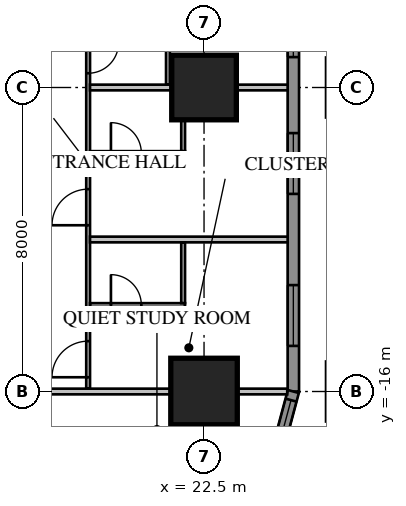
"""IFC4 building model, lengths in metres.
Left out: names, types, materials, properties, quantities, classifications, styles, units other than length and angle.
Written with IfcOpenShell. Run it as: python <this file> out.ifc"""

import sys

from ifc_helpers import new_model, si_unit, direction, frame, frame_2d, origin, origin_2d, place, context, subcontext, project, spatial, rectangle, extrude, element, fill, save


model = new_model("IFC4")
c1 = context("Model", 3, precision=1e-05, world=origin(), true_north=direction((0.0, 1.0)))
c2 = subcontext(c1, "Body", "Model", "MODEL_VIEW")
j1 = project(units=[si_unit("LENGTHUNIT", "METRE"), si_unit("PLANEANGLEUNIT", "RADIAN")], contexts=[c1])
p1 = place(None, origin())
s1 = spatial("IfcSite", under=j1, at=p1, CompositionType="ELEMENT")
p2 = place(p1, origin())
s2 = spatial("IfcBuilding", under=s1, at=p2, CompositionType="ELEMENT")
p3 = place(p2, frame((0.0, 0.0, 42.95)))
s3 = spatial("IfcBuildingStorey", under=s2, at=p3, CompositionType="ELEMENT", Elevation=42.95)
p4 = place(p3, frame((22.5, -16.0, 0.0), z_axis=(0.0, 0.0, 1.0), x_axis=(1.0, 0.0, 0.0)))
e1 = element("IfcColumn", 1, at=p4, inside=s3, PredefinedType="COLUMN", context=c2, shape_type="SweptSolid", body=[
    extrude(rectangle(XDim=1.75, YDim=1.75, at=origin_2d()), origin(), (0.0, 0.0, 1.0), 3.85),
])
p5 = place(p3, frame((22.5, -8.0, 0.0), z_axis=(0.0, 0.0, 1.0), x_axis=(1.0, 0.0, 0.0)))
e2 = element("IfcColumn", 2, at=p5, inside=s3, PredefinedType="COLUMN", context=c2, shape_type="SweptSolid", body=[
    extrude(rectangle(XDim=1.7, YDim=1.7, at=origin_2d()), origin(), (0.0, 0.0, 1.0), 3.85),
])
p6 = place(p3, frame((24.85, -16.0, 0.0), z_axis=(0.0, 0.0, 1.0), x_axis=(0.0, 1.0, 0.0)))
e3 = element("IfcWall", 3, at=p6, inside=s3, PredefinedType="SOLIDWALL", context=c2, shape_type="SweptSolid", body=[
    extrude(rectangle(XDim=32.0, YDim=0.3, at=frame_2d((16.0, 0.0))), origin(), (0.0, 0.0, 1.0), 3.65),
])
p7 = place(p6, frame((1.2, 0.0, 0.75)))
e4 = element("IfcOpeningElement", 4, at=p7, cuts=e3, PredefinedType="OPENING", context=c2, shape_type="SweptSolid", body=[
    extrude(rectangle(XDim=1.6, YDim=1.8, at=frame_2d((0.8, 0.9))), frame((0.0, 0.17, 0.0), z_axis=(0.0, -1.0, 0.0), x_axis=(1.0, 0.0, 0.0)), (0.0, 0.0, 1.0), 0.34),
])
p8 = place(p6, frame((5.2, 0.0, 0.75)))
e5 = element("IfcOpeningElement", 5, at=p8, cuts=e3, PredefinedType="OPENING", context=c2, shape_type="SweptSolid", body=[
    extrude(rectangle(XDim=1.6, YDim=1.8, at=frame_2d((0.8, 0.9))), frame((0.0, 0.17, 0.0), z_axis=(0.0, -1.0, 0.0), x_axis=(1.0, 0.0, 0.0)), (0.0, 0.0, 1.0), 0.34),
])
p9 = place(p6, frame((17.2, 0.0, 0.75)))
e6 = element("IfcOpeningElement", 6, at=p9, cuts=e3, PredefinedType="OPENING", context=c2, shape_type="SweptSolid", body=[
    extrude(rectangle(XDim=1.6, YDim=1.8, at=frame_2d((0.8, 0.9))), frame((0.0, 0.17, 0.0), z_axis=(0.0, -1.0, 0.0), x_axis=(1.0, 0.0, 0.0)), (0.0, 0.0, 1.0), 0.34),
])
p10 = place(p6, frame((21.2, 0.0, 0.75)))
e7 = element("IfcOpeningElement", 7, at=p10, cuts=e3, PredefinedType="OPENING", context=c2, shape_type="SweptSolid", body=[
    extrude(rectangle(XDim=1.6, YDim=1.8, at=frame_2d((0.8, 0.9))), frame((0.0, 0.17, 0.0), z_axis=(0.0, -1.0, 0.0), x_axis=(1.0, 0.0, 0.0)), (0.0, 0.0, 1.0), 0.34),
])
p11 = place(p6, frame((25.2, 0.0, 0.75)))
e8 = element("IfcOpeningElement", 8, at=p11, cuts=e3, PredefinedType="OPENING", context=c2, shape_type="SweptSolid", body=[
    extrude(rectangle(XDim=1.6, YDim=1.8, at=frame_2d((0.8, 0.9))), frame((0.0, 0.17, 0.0), z_axis=(0.0, -1.0, 0.0), x_axis=(1.0, 0.0, 0.0)), (0.0, 0.0, 1.0), 0.34),
])
p12 = place(p6, frame((29.2, 0.0, 0.75)))
e9 = element("IfcOpeningElement", 9, at=p12, cuts=e3, PredefinedType="OPENING", context=c2, shape_type="SweptSolid", body=[
    extrude(rectangle(XDim=1.6, YDim=1.8, at=frame_2d((0.8, 0.9))), frame((0.0, 0.17, 0.0), z_axis=(0.0, -1.0, 0.0), x_axis=(1.0, 0.0, 0.0)), (0.0, 0.0, 1.0), 0.34),
])
p13 = place(p6, frame((8.8, 0.0, 0.75)))
e10 = element("IfcOpeningElement", 10, at=p13, cuts=e3, PredefinedType="OPENING", context=c2, shape_type="SweptSolid", body=[
    extrude(rectangle(XDim=2.4, YDim=1.8, at=frame_2d((1.2, 0.9))), frame((0.0, 0.17, 0.0), z_axis=(0.0, -1.0, 0.0), x_axis=(1.0, 0.0, 0.0)), (0.0, 0.0, 1.0), 0.34),
])
p14 = place(p6, frame((13.812, 0.0, 0.0)))
e11 = element("IfcOpeningElement", 11, at=p14, cuts=e3, PredefinedType="OPENING", context=c2, shape_type="SweptSolid", body=[
    extrude(rectangle(XDim=1.0, YDim=2.4, at=frame_2d((0.5, 1.2))), frame((0.0, 0.17, 0.0), z_axis=(0.0, -1.0, 0.0), x_axis=(1.0, 0.0, 0.0)), (0.0, 0.0, 1.0), 0.34),
])
p15 = place(p3, frame((23.664, -20.425, 0.0), z_axis=(0.0, 0.0, 1.0), x_axis=(0.258839972501, 0.965920218567, 0.0)))
e12 = element("IfcWall", 12, at=p15, inside=s3, PredefinedType="SOLIDWALL", context=c2, shape_type="SweptSolid", body=[
    extrude(rectangle(XDim=4.581, YDim=0.3, at=frame_2d((2.291, 0.0))), origin(), (0.0, 0.0, 1.0), 3.65),
])
p16 = place(p15, frame((2.746, 0.0, 0.75)))
e13 = element("IfcOpeningElement", 13, at=p16, cuts=e12, PredefinedType="OPENING", context=c2, shape_type="SweptSolid", body=[
    extrude(rectangle(XDim=1.6, YDim=1.8, at=frame_2d((0.8, 0.9))), frame((0.0, 0.17, 0.0), z_axis=(0.0, -1.0, 0.0), x_axis=(1.0, 0.0, 0.0)), (0.0, 0.0, 1.0), 0.34),
])
p17 = place(p3, frame((19.45, -15.925, 0.0), z_axis=(0.0, 0.0, 1.0), x_axis=(0.0, 1.0, 0.0)))
e14 = element("IfcWall", 14, at=p17, inside=s3, PredefinedType="PARTITIONING", context=c2, shape_type="SweptSolid", body=[
    extrude(rectangle(XDim=11.85, YDim=0.1, at=frame_2d((5.925, 0.0))), origin(), (0.0, 0.0, 1.0), 3.65),
])
p18 = place(p17, frame((10.125, 0.0, 0.0)))
e15 = element("IfcOpeningElement", 15, at=p18, cuts=e14, PredefinedType="OPENING", context=c2, shape_type="SweptSolid", body=[
    extrude(rectangle(XDim=1.0, YDim=2.1, at=frame_2d((0.5, 1.05))), frame((0.0, 0.07, 0.0), z_axis=(0.0, -1.0, 0.0), x_axis=(1.0, 0.0, 0.0)), (0.0, 0.0, 1.0), 0.14),
])
p19 = place(p17, frame((8.3, 0.0, 0.0)))
e16 = element("IfcOpeningElement", 16, at=p19, cuts=e14, PredefinedType="OPENING", context=c2, shape_type="SweptSolid", body=[
    extrude(rectangle(XDim=0.8, YDim=2.1, at=frame_2d((0.4, 1.05))), frame((0.0, 0.07, 0.0), z_axis=(0.0, -1.0, 0.0), x_axis=(1.0, 0.0, 0.0)), (0.0, 0.0, 1.0), 0.14),
])
p20 = place(p17, frame((0.3, 0.0, 0.0)))
e17 = element("IfcOpeningElement", 17, at=p20, cuts=e14, PredefinedType="OPENING", context=c2, shape_type="SweptSolid", body=[
    extrude(rectangle(XDim=0.95, YDim=2.1, at=frame_2d((0.475, 1.05))), frame((0.0, 0.07, 0.0), z_axis=(0.0, -1.0, 0.0), x_axis=(1.0, 0.0, 0.0)), (0.0, 0.0, 1.0), 0.14),
])
p21 = place(p17, frame((4.3, 0.0, 0.0)))
e18 = element("IfcOpeningElement", 18, at=p21, cuts=e14, PredefinedType="OPENING", context=c2, shape_type="SweptSolid", body=[
    extrude(rectangle(XDim=0.95, YDim=2.1, at=frame_2d((0.475, 1.05))), frame((0.0, 0.07, 0.0), z_axis=(0.0, -1.0, 0.0), x_axis=(1.0, 0.0, 0.0)), (0.0, 0.0, 1.0), 0.14),
])
p22 = place(p3, frame((21.55, -7.925, 0.0), z_axis=(0.0, 0.0, 1.0), x_axis=(0.0, 1.0, 0.0)))
e19 = element("IfcWall", 19, at=p22, inside=s3, PredefinedType="PARTITIONING", context=c2, shape_type="SweptSolid", body=[
    extrude(rectangle(XDim=1.7, YDim=0.1, at=frame_2d((0.85, 0.0))), origin(), (0.0, 0.0, 1.0), 3.65),
])
p23 = place(p3, frame((18.1, -16.0, 0.0), z_axis=(0.0, 0.0, 1.0), x_axis=(1.0, 0.0, 0.0)))
e20 = element("IfcWall", 20, at=p23, inside=s3, PredefinedType="PARTITIONING", context=c2, shape_type="SweptSolid", body=[
    extrude(rectangle(XDim=6.589, YDim=0.15, at=frame_2d((3.295, 0.0))), origin(), (0.0, 0.0, 1.0), 3.65),
])
for number, where, z_axis, x_axis in (
    (21, (19.5, -12.0, 0.0), (0.0, 0.0, 1.0), (1.0, 0.0, 0.0)),
    (22, (19.5, -8.0, 0.0), (0.0, 0.0, 1.0), (1.0, 0.0, 0.0)),
):
    element("IfcWall", number, at=place(p3, frame(where, z_axis=z_axis, x_axis=x_axis)), inside=s3, PredefinedType="PARTITIONING", context=c2, shape_type="SweptSolid", body=[
        extrude(rectangle(XDim=5.2, YDim=0.15, at=frame_2d((2.6, 0.0))), origin(), (0.0, 0.0, 1.0), 3.65),
    ])
p24 = place(p3, frame((19.5, -13.725, 0.0), z_axis=(0.0, 0.0, 1.0), x_axis=(1.0, 0.0, 0.0)))
e23 = element("IfcWall", 23, at=p24, inside=s3, PredefinedType="PARTITIONING", context=c2, shape_type="SweptSolid", body=[
    extrude(rectangle(XDim=2.5, YDim=0.1, at=frame_2d((1.25, 0.0))), origin(), (0.0, 0.0, 1.0), 3.65),
])
p25 = place(p24, frame((0.55, 0.0, 0.0)))
e24 = element("IfcOpeningElement", 24, at=p25, cuts=e23, PredefinedType="OPENING", context=c2, shape_type="SweptSolid", body=[
    extrude(rectangle(XDim=0.8, YDim=2.1, at=frame_2d((0.4, 1.05))), frame((0.0, 0.07, 0.0), z_axis=(0.0, -1.0, 0.0), x_axis=(1.0, 0.0, 0.0)), (0.0, 0.0, 1.0), 0.14),
])
p26 = place(p3, frame((21.95, -13.675, 0.0), z_axis=(0.0, 0.0, 1.0), x_axis=(0.0, 1.0, 0.0)))
e25 = element("IfcWall", 25, at=p26, inside=s3, PredefinedType="PARTITIONING", context=c2, shape_type="SweptSolid", body=[
    extrude(rectangle(XDim=1.6, YDim=0.1, at=frame_2d((0.8, 0.0))), origin(), (0.0, 0.0, 1.0), 3.65),
])
p27 = place(p3, frame((19.5, -9.725, 0.0), z_axis=(0.0, 0.0, 1.0), x_axis=(1.0, 0.0, 0.0)))
e26 = element("IfcWall", 26, at=p27, inside=s3, PredefinedType="PARTITIONING", context=c2, shape_type="SweptSolid", body=[
    extrude(rectangle(XDim=2.5, YDim=0.1, at=frame_2d((1.25, 0.0))), origin(), (0.0, 0.0, 1.0), 3.65),
])
p28 = place(p27, frame((0.55, 0.0, 0.0)))
e27 = element("IfcOpeningElement", 27, at=p28, cuts=e26, PredefinedType="OPENING", context=c2, shape_type="SweptSolid", body=[
    extrude(rectangle(XDim=0.8, YDim=2.1, at=frame_2d((0.4, 1.05))), frame((0.0, 0.07, 0.0), z_axis=(0.0, -1.0, 0.0), x_axis=(1.0, 0.0, 0.0)), (0.0, 0.0, 1.0), 0.14),
])
p29 = place(p3, frame((21.95, -9.675, 0.0), z_axis=(0.0, 0.0, 1.0), x_axis=(0.0, 1.0, 0.0)))
e28 = element("IfcWall", 28, at=p29, inside=s3, PredefinedType="PARTITIONING", context=c2, shape_type="SweptSolid", body=[
    extrude(rectangle(XDim=1.6, YDim=0.1, at=frame_2d((0.8, 0.0))), origin(), (0.0, 0.0, 1.0), 3.65),
])
p30 = place(p16, origin())
e29 = element("IfcWindow", 29, at=p30, inside=s3, PartitioningType="SINGLE_PANEL", PredefinedType="WINDOW", context=c2, shape_type="SweptSolid", body=[
    extrude(rectangle(XDim=1.6, YDim=1.8, at=frame_2d((0.8, 0.9))), frame((0.0, 0.03, 0.0), z_axis=(0.0, -1.0, 0.0), x_axis=(1.0, 0.0, 0.0)), (0.0, 0.0, 1.0), 0.06),
])
fill(e13, e29)
p31 = place(p7, origin())
e30 = element("IfcWindow", 30, at=p31, inside=s3, PartitioningType="SINGLE_PANEL", PredefinedType="WINDOW", context=c2, shape_type="SweptSolid", body=[
    extrude(rectangle(XDim=1.6, YDim=1.8, at=frame_2d((0.8, 0.9))), frame((0.0, 0.03, 0.0), z_axis=(0.0, -1.0, 0.0), x_axis=(1.0, 0.0, 0.0)), (0.0, 0.0, 1.0), 0.06),
])
fill(e4, e30)
p32 = place(p8, origin())
e31 = element("IfcWindow", 31, at=p32, inside=s3, PartitioningType="SINGLE_PANEL", PredefinedType="WINDOW", context=c2, shape_type="SweptSolid", body=[
    extrude(rectangle(XDim=1.6, YDim=1.8, at=frame_2d((0.8, 0.9))), frame((0.0, 0.03, 0.0), z_axis=(0.0, -1.0, 0.0), x_axis=(1.0, 0.0, 0.0)), (0.0, 0.0, 1.0), 0.06),
])
fill(e5, e31)
p33 = place(p13, origin())
e32 = element("IfcWindow", 32, at=p33, inside=s3, PartitioningType="SINGLE_PANEL", PredefinedType="WINDOW", context=c2, shape_type="SweptSolid", body=[
    extrude(rectangle(XDim=2.4, YDim=1.8, at=frame_2d((1.2, 0.9))), frame((0.0, 0.03, 0.0), z_axis=(0.0, -1.0, 0.0), x_axis=(1.0, 0.0, 0.0)), (0.0, 0.0, 1.0), 0.06),
])
fill(e10, e32)
p34 = place(p19, origin())
e33 = element("IfcDoor", 33, at=p34, inside=s3, OperationType="SINGLE_SWING_RIGHT", PredefinedType="DOOR", context=c2, shape_type="SweptSolid", body=[
    extrude(rectangle(XDim=0.8, YDim=2.1, at=frame_2d((0.4, 1.05))), frame((0.0, 0.025, 0.0), z_axis=(0.0, -1.0, 0.0), x_axis=(1.0, 0.0, 0.0)), (0.0, 0.0, 1.0), 0.05),
])
fill(e16, e33)
p35 = place(p20, origin())
e34 = element("IfcDoor", 34, at=p35, inside=s3, OperationType="SINGLE_SWING_LEFT", PredefinedType="DOOR", context=c2, shape_type="SweptSolid", body=[
    extrude(rectangle(XDim=0.95, YDim=2.1, at=frame_2d((0.475, 1.05))), frame((0.0, 0.025, 0.0), z_axis=(0.0, -1.0, 0.0), x_axis=(1.0, 0.0, 0.0)), (0.0, 0.0, 1.0), 0.05),
])
fill(e17, e34)
p36 = place(p25, origin())
e35 = element("IfcDoor", 35, at=p36, inside=s3, OperationType="SINGLE_SWING_LEFT", PredefinedType="DOOR", context=c2, shape_type="SweptSolid", body=[
    extrude(rectangle(XDim=0.8, YDim=2.1, at=frame_2d((0.4, 1.05))), frame((0.0, 0.025, 0.0), z_axis=(0.0, -1.0, 0.0), x_axis=(1.0, 0.0, 0.0)), (0.0, 0.0, 1.0), 0.05),
])
fill(e24, e35)
p37 = place(p21, origin())
e36 = element("IfcDoor", 36, at=p37, inside=s3, OperationType="SINGLE_SWING_LEFT", PredefinedType="DOOR", context=c2, shape_type="SweptSolid", body=[
    extrude(rectangle(XDim=0.95, YDim=2.1, at=frame_2d((0.475, 1.05))), frame((0.0, 0.025, 0.0), z_axis=(0.0, -1.0, 0.0), x_axis=(1.0, 0.0, 0.0)), (0.0, 0.0, 1.0), 0.05),
])
fill(e18, e36)
p38 = place(p28, origin())
e37 = element("IfcDoor", 37, at=p38, inside=s3, OperationType="SINGLE_SWING_LEFT", PredefinedType="DOOR", context=c2, shape_type="SweptSolid", body=[
    extrude(rectangle(XDim=0.8, YDim=2.1, at=frame_2d((0.4, 1.05))), frame((0.0, 0.025, 0.0), z_axis=(0.0, -1.0, 0.0), x_axis=(1.0, 0.0, 0.0)), (0.0, 0.0, 1.0), 0.05),
])
fill(e27, e37)
save(model, sys.argv[1])
